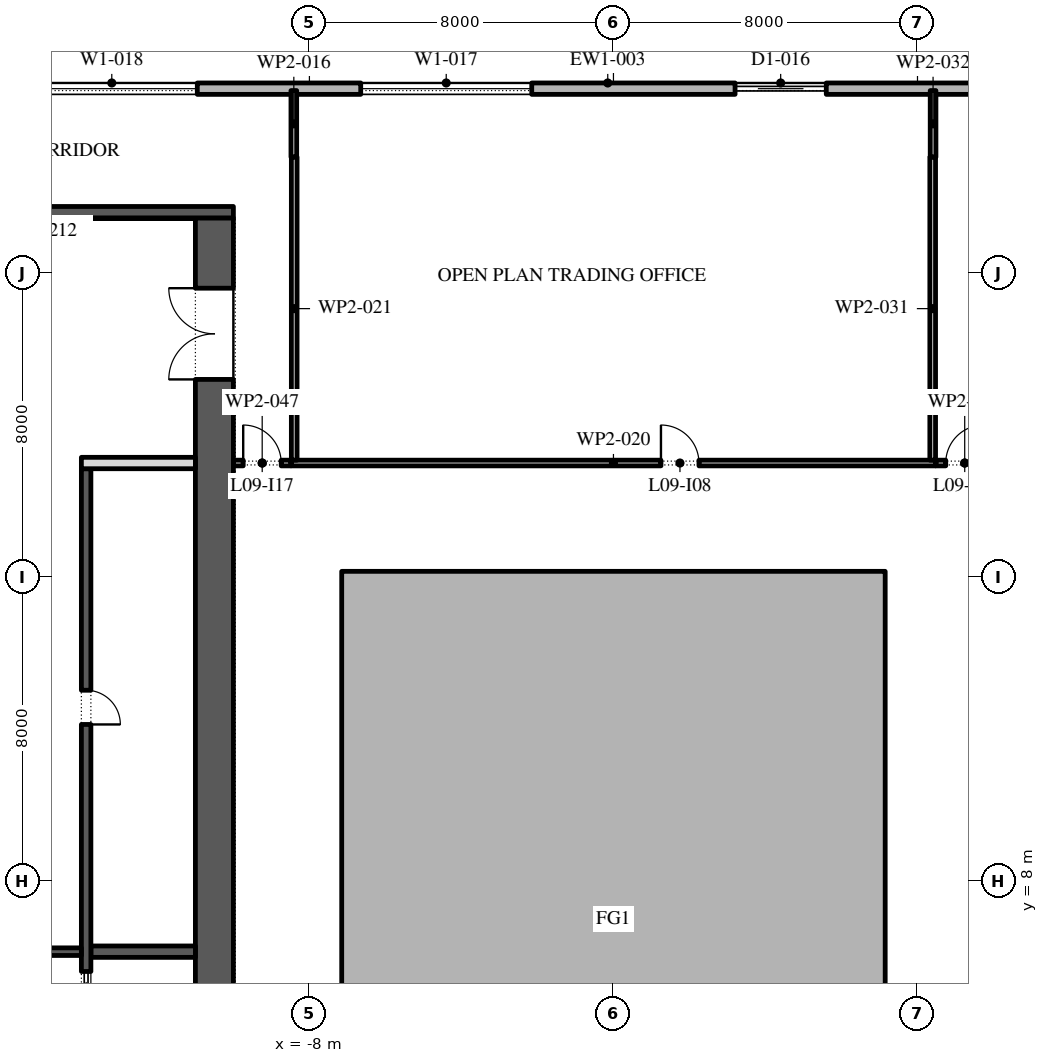
"""IFC4 building model, lengths in metres.
Left out: names, types, materials, properties, quantities, classifications, styles, units other than length and angle.
Written with IfcOpenShell. Run it as: python <this file> out.ifc"""

import sys

from ifc_helpers import new_model, si_unit, direction, frame, frame_2d, origin, place, context, subcontext, project, spatial, polyline, rectangle, outline, extrude, element, fill, save


model = new_model("IFC4")
c1 = context("Model", 3, precision=1e-05, world=origin(), true_north=direction((0.0, 1.0)))
c2 = subcontext(c1, "Body", "Model", "MODEL_VIEW")
j1 = project(units=[si_unit("LENGTHUNIT", "METRE"), si_unit("PLANEANGLEUNIT", "RADIAN")], contexts=[c1])
p1 = place(None, origin())
s1 = spatial("IfcSite", under=j1, at=p1, CompositionType="ELEMENT")
p2 = place(p1, origin())
s2 = spatial("IfcBuilding", under=s1, at=p2, CompositionType="ELEMENT")
p3 = place(p2, frame((0.0, 0.0, 48.0)))
s3 = spatial("IfcBuildingStorey", under=s2, at=p3, CompositionType="ELEMENT", Elevation=48.0)
p4 = place(p3, origin())
e1 = element("IfcWall", 1, at=p4, inside=s3, PredefinedType="STANDARD", context=c2, shape_type="SweptSolid", body=[
    extrude(outline(polyline([(-7.15, -2.15), (7.15, -2.15), (7.15, 16.15), (-7.15, 16.15), (-7.15, -2.15)]), holes=[polyline([(-7.0, -2.0), (-7.0, 16.0), (7.0, 16.0), (7.0, -2.0), (-7.0, -2.0)])]), origin(), (0.0, 0.0, 1.0), 4.0),
])
p5 = place(p3, frame((26.1, 28.85, 0.0), z_axis=(0.0, 0.0, 1.0), x_axis=(-1.0, 0.0, 0.0)))
e2 = element("IfcWall", 2, at=p5, inside=s3, PredefinedType="STANDARD", context=c2, shape_type="SweptSolid", body=[
    extrude(rectangle(XDim=52.5, YDim=0.3, at=frame_2d((26.25, 0.0))), origin(), (0.0, 0.0, 1.0), 4.0),
])
p6 = place(p5, frame((2.0, 0.0, 0.45)))
e3 = element("IfcOpeningElement", 3, at=p6, cuts=e2, PredefinedType="OPENING", context=c2, shape_type="SweptSolid", body=[
    extrude(rectangle(XDim=4.5, YDim=3.05, at=frame_2d((2.25, 1.525))), frame((0.0, 0.16, 0.0), z_axis=(0.0, -1.0, 0.0), x_axis=(1.0, 0.0, 0.0)), (0.0, 0.0, 1.0), 0.32),
])
p7 = place(p5, frame((10.65, 0.0, 0.45)))
e4 = element("IfcOpeningElement", 4, at=p7, cuts=e2, PredefinedType="OPENING", context=c2, shape_type="SweptSolid", body=[
    extrude(rectangle(XDim=4.5, YDim=3.05, at=frame_2d((2.25, 1.525))), frame((0.0, 0.16, 0.0), z_axis=(0.0, -1.0, 0.0), x_axis=(1.0, 0.0, 0.0)), (0.0, 0.0, 1.0), 0.32),
])
p8 = place(p5, frame((20.5, 0.0, 0.0)))
e5 = element("IfcOpeningElement", 5, at=p8, cuts=e2, PredefinedType="OPENING", context=c2, shape_type="SweptSolid", body=[
    extrude(rectangle(XDim=2.4, YDim=3.5, at=frame_2d((1.2, 1.75))), frame((0.0, 0.16, 0.0), z_axis=(0.0, -1.0, 0.0), x_axis=(1.0, 0.0, 0.0)), (0.0, 0.0, 1.0), 0.32),
])
p9 = place(p5, frame((28.25, 0.0, 0.45)))
e6 = element("IfcOpeningElement", 6, at=p9, cuts=e2, PredefinedType="OPENING", context=c2, shape_type="SweptSolid", body=[
    extrude(rectangle(XDim=4.5, YDim=3.05, at=frame_2d((2.25, 1.525))), frame((0.0, 0.16, 0.0), z_axis=(0.0, -1.0, 0.0), x_axis=(1.0, 0.0, 0.0)), (0.0, 0.0, 1.0), 0.32),
])
p10 = place(p5, frame((37.05, 0.0, 0.45)))
e7 = element("IfcOpeningElement", 7, at=p10, cuts=e2, PredefinedType="OPENING", context=c2, shape_type="SweptSolid", body=[
    extrude(rectangle(XDim=4.5, YDim=3.05, at=frame_2d((2.25, 1.525))), frame((0.0, 0.16, 0.0), z_axis=(0.0, -1.0, 0.0), x_axis=(1.0, 0.0, 0.0)), (0.0, 0.0, 1.0), 0.32),
])
p11 = place(p5, frame((45.85, 0.0, 0.45)))
e8 = element("IfcOpeningElement", 8, at=p11, cuts=e2, PredefinedType="OPENING", context=c2, shape_type="SweptSolid", body=[
    extrude(rectangle(XDim=4.5, YDim=3.05, at=frame_2d((2.25, 1.525))), frame((0.0, 0.16, 0.0), z_axis=(0.0, -1.0, 0.0), x_axis=(1.0, 0.0, 0.0)), (0.0, 0.0, 1.0), 0.32),
])
p12 = place(p3, frame((-10.5, -2.45, 0.0), z_axis=(0.0, 0.0, 1.0), x_axis=(0.0, 1.0, 0.0)))
e9 = element("IfcWall", 9, at=p12, inside=s3, PredefinedType="SHEAR", context=c2, shape_type="SweptSolid", body=[
    extrude(rectangle(XDim=27.9, YDim=1.0, at=frame_2d((13.95, 0.0))), origin(), (0.0, 0.0, 1.0), 4.0),
])
p13 = place(p12, frame((23.65, 0.0, 0.0)))
e10 = element("IfcOpeningElement", 10, at=p13, cuts=e9, PredefinedType="OPENING", context=c2, shape_type="SweptSolid", body=[
    extrude(rectangle(XDim=2.4, YDim=2.1, at=frame_2d((1.2, 1.05))), frame((0.0, 0.51, 0.0), z_axis=(0.0, -1.0, 0.0), x_axis=(1.0, 0.0, 0.0)), (0.0, 0.0, 1.0), 1.02),
])
p14 = place(p12, frame((1.087, 0.0, 0.0)))
e11 = element("IfcOpeningElement", 11, at=p14, cuts=e9, PredefinedType="OPENING", context=c2, shape_type="SweptSolid", body=[
    extrude(rectangle(XDim=0.9, YDim=2.1, at=frame_2d((0.45, 1.05))), frame((0.0, 0.51, 0.0), z_axis=(0.0, -1.0, 0.0), x_axis=(1.0, 0.0, 0.0)), (0.0, 0.0, 1.0), 1.02),
])
p15 = place(p12, frame((4.312, 0.0, 0.0)))
e12 = element("IfcOpeningElement", 12, at=p15, cuts=e9, PredefinedType="OPENING", context=c2, shape_type="SweptSolid", body=[
    extrude(rectangle(XDim=0.9, YDim=2.1, at=frame_2d((0.45, 1.05))), frame((0.0, 0.51, 0.0), z_axis=(0.0, -1.0, 0.0), x_axis=(1.0, 0.0, 0.0)), (0.0, 0.0, 1.0), 1.02),
])
p16 = place(p3, frame((-22.0, 25.6, 0.0), z_axis=(0.0, 0.0, 1.0), x_axis=(1.0, 0.0, 0.0)))
e13 = element("IfcWall", 13, at=p16, inside=s3, PredefinedType="SHEAR", context=c2, shape_type="SweptSolid", body=[
    extrude(rectangle(XDim=12.0, YDim=0.3, at=frame_2d((6.0, 0.0))), origin(), (0.0, 0.0, 1.0), 4.0),
])
p17 = place(p3, frame((-13.75, 6.143, 0.0), z_axis=(0.0, 0.0, 1.0), x_axis=(1.0, 0.0, 0.0)))
e14 = element("IfcWall", 14, at=p17, inside=s3, PredefinedType="SHEAR", context=c2, shape_type="SweptSolid", body=[
    extrude(rectangle(XDim=2.75, YDim=0.3, at=frame_2d((1.375, 0.0))), origin(), (0.0, 0.0, 1.0), 4.0),
])
p18 = place(p3, frame((-13.875, -2.45, 0.0), z_axis=(0.0, 0.0, 1.0), x_axis=(0.0, 1.0, 0.0)))
e15 = element("IfcWall", 15, at=p18, inside=s3, PredefinedType="SHEAR", context=c2, shape_type="SweptSolid", body=[
    extrude(rectangle(XDim=21.3, YDim=0.25, at=frame_2d((10.65, 0.0))), origin(), (0.0, 0.0, 1.0), 4.0),
])
p19 = place(p18, frame((14.571, 0.0, 0.0)))
e16 = element("IfcOpeningElement", 16, at=p19, cuts=e15, PredefinedType="OPENING", context=c2, shape_type="SweptSolid", body=[
    extrude(rectangle(XDim=0.9, YDim=2.1, at=frame_2d((0.45, 1.05))), frame((0.0, 0.135, 0.0), z_axis=(0.0, -1.0, 0.0), x_axis=(1.0, 0.0, 0.0)), (0.0, 0.0, 1.0), 0.27),
])
p20 = place(p18, frame((6.971, 0.0, 0.0)))
e17 = element("IfcOpeningElement", 17, at=p20, cuts=e15, PredefinedType="OPENING", context=c2, shape_type="SweptSolid", body=[
    extrude(rectangle(XDim=1.1, YDim=2.1, at=frame_2d((0.55, 1.05))), frame((0.0, 0.135, 0.0), z_axis=(0.0, -1.0, 0.0), x_axis=(1.0, 0.0, 0.0)), (0.0, 0.0, 1.0), 0.27),
])
p21 = place(p3, frame((-14.0, 19.0, 0.0), z_axis=(0.0, 0.0, 1.0), x_axis=(1.0, 0.0, 0.0)))
e18 = element("IfcWall", 18, at=p21, inside=s3, PredefinedType="PARTITIONING", context=c2, shape_type="SweptSolid", body=[
    extrude(rectangle(XDim=3.0, YDim=0.3, at=frame_2d((1.5, 0.0))), origin(), (0.0, 0.0, 1.0), 4.0),
])
p22 = place(p3, frame((-18.0, 6.143, 0.0), z_axis=(0.0, 0.0, 1.0), x_axis=(1.0, 0.0, 0.0)))
e19 = element("IfcWall", 19, at=p22, inside=s3, PredefinedType="SHEAR", context=c2, shape_type="SweptSolid", body=[
    extrude(rectangle(XDim=4.0, YDim=0.2, at=frame_2d((2.0, 0.0))), origin(), (0.0, 0.0, 1.0), 4.0),
])
p23 = place(p22, frame((1.4, 0.0, 0.0)))
e20 = element("IfcOpeningElement", 20, at=p23, cuts=e19, PredefinedType="OPENING", context=c2, shape_type="SweptSolid", body=[
    extrude(rectangle(XDim=1.2, YDim=2.1, at=frame_2d((0.6, 1.05))), frame((0.0, 0.11, 0.0), z_axis=(0.0, -1.0, 0.0), x_axis=(1.0, 0.0, 0.0)), (0.0, 0.0, 1.0), 0.22),
])
p24 = place(p3, frame((-8.41, 28.8, 0.0), z_axis=(0.0, 0.0, 1.0), x_axis=(0.0, -1.0, 0.0)))
e21 = element("IfcWall", 21, at=p24, inside=s3, PredefinedType="PARTITIONING", context=c2, shape_type="SweptSolid", body=[
    extrude(rectangle(XDim=1.75, YDim=0.15, at=frame_2d((0.875, 0.0))), origin(), (0.0, 0.0, 1.0), 4.0),
])
p25 = place(p3, frame((-8.475, 19.0, 0.0), z_axis=(0.0, 0.0, 1.0), x_axis=(1.0, 0.0, 0.0)))
e22 = element("IfcWall", 22, at=p25, inside=s3, PredefinedType="PARTITIONING", context=c2, shape_type="SweptSolid", body=[
    extrude(rectangle(XDim=16.95, YDim=0.15, at=frame_2d((8.475, 0.0))), origin(), (0.0, 0.0, 1.0), 4.0),
])
p26 = place(p25, frame((9.725, 0.0, 0.0)))
e23 = element("IfcOpeningElement", 23, at=p26, cuts=e22, PredefinedType="OPENING", context=c2, shape_type="SweptSolid", body=[
    extrude(rectangle(XDim=1.0, YDim=2.1, at=frame_2d((0.5, 1.05))), frame((0.0, 0.085, 0.0), z_axis=(0.0, -1.0, 0.0), x_axis=(1.0, 0.0, 0.0)), (0.0, 0.0, 1.0), 0.17),
])
for number, where, z_axis, x_axis in (
    (24, (-8.4, 27.05, 0.0), (0.0, 0.0, 1.0), (0.0, -1.0, 0.0)),
    (25, (8.4, 19.075, 0.0), (0.0, 0.0, 1.0), (0.0, 1.0, 0.0)),
):
    element("IfcWall", number, at=place(p3, frame(where, z_axis=z_axis, x_axis=x_axis)), inside=s3, PredefinedType="PARTITIONING", context=c2, shape_type="SweptSolid", body=[
        extrude(rectangle(XDim=7.975, YDim=0.15, at=frame_2d((3.988, 0.0))), origin(), (0.0, 0.0, 1.0), 4.0),
    ])
p27 = place(p3, frame((8.41, 27.05, 0.0), z_axis=(0.0, 0.0, 1.0), x_axis=(0.0, 1.0, 0.0)))
e26 = element("IfcWall", 26, at=p27, inside=s3, PredefinedType="PARTITIONING", context=c2, shape_type="SweptSolid", body=[
    extrude(rectangle(XDim=1.75, YDim=0.15, at=frame_2d((0.875, 0.0))), origin(), (0.0, 0.0, 1.0), 4.0),
])
p28 = place(p3, frame((-10.0, 19.0, 0.0), z_axis=(0.0, 0.0, 1.0), x_axis=(1.0, 0.0, 0.0)))
e27 = element("IfcWall", 27, at=p28, inside=s3, PredefinedType="PARTITIONING", context=c2, shape_type="SweptSolid", body=[
    extrude(rectangle(XDim=1.515, YDim=0.15, at=frame_2d((0.757, 0.0))), origin(), (0.0, 0.0, 1.0), 4.0),
])
p29 = place(p28, frame((0.258, 0.0, 0.0)))
e28 = element("IfcOpeningElement", 28, at=p29, cuts=e27, PredefinedType="OPENING", context=c2, shape_type="SweptSolid", body=[
    extrude(rectangle(XDim=1.0, YDim=2.1, at=frame_2d((0.5, 1.05))), frame((0.0, 0.085, 0.0), z_axis=(0.0, -1.0, 0.0), x_axis=(1.0, 0.0, 0.0)), (0.0, 0.0, 1.0), 0.17),
])
p30 = place(p3, frame((8.485, 19.0, 0.0), z_axis=(0.0, 0.0, 1.0), x_axis=(1.0, 0.0, 0.0)))
e29 = element("IfcWall", 29, at=p30, inside=s3, PredefinedType="PARTITIONING", context=c2, shape_type="SweptSolid", body=[
    extrude(rectangle(XDim=1.515, YDim=0.15, at=frame_2d((0.757, 0.0))), origin(), (0.0, 0.0, 1.0), 4.0),
])
p31 = place(p30, frame((0.258, 0.0, 0.0)))
e30 = element("IfcOpeningElement", 30, at=p31, cuts=e29, PredefinedType="OPENING", context=c2, shape_type="SweptSolid", body=[
    extrude(rectangle(XDim=1.0, YDim=2.1, at=frame_2d((0.5, 1.05))), frame((0.0, 0.085, 0.0), z_axis=(0.0, -1.0, 0.0), x_axis=(1.0, 0.0, 0.0)), (0.0, 0.0, 1.0), 0.17),
])
p32 = place(p8, origin())
e31 = element("IfcDoor", 31, at=p32, inside=s3, OperationType="DOUBLE_DOOR_SLIDING", PredefinedType="DOOR", context=c2, shape_type="SweptSolid", body=[
    extrude(rectangle(XDim=2.4, YDim=3.5, at=frame_2d((1.2, 1.75))), frame((0.0, 0.025, 0.0), z_axis=(0.0, -1.0, 0.0), x_axis=(1.0, 0.0, 0.0)), (0.0, 0.0, 1.0), 0.05),
])
fill(e5, e31)
p33 = place(p9, origin())
e32 = element("IfcWindow", 32, at=p33, inside=s3, PartitioningType="DOUBLE_PANEL_VERTICAL", PredefinedType="WINDOW", context=c2, shape_type="SweptSolid", body=[
    extrude(rectangle(XDim=4.5, YDim=3.05, at=frame_2d((2.25, 1.525))), frame((0.0, 0.03, 0.0), z_axis=(0.0, -1.0, 0.0), x_axis=(1.0, 0.0, 0.0)), (0.0, 0.0, 1.0), 0.06),
])
fill(e6, e32)
p34 = place(p10, origin())
e33 = element("IfcWindow", 33, at=p34, inside=s3, PartitioningType="DOUBLE_PANEL_VERTICAL", PredefinedType="WINDOW", context=c2, shape_type="SweptSolid", body=[
    extrude(rectangle(XDim=4.5, YDim=3.05, at=frame_2d((2.25, 1.525))), frame((0.0, 0.03, 0.0), z_axis=(0.0, -1.0, 0.0), x_axis=(1.0, 0.0, 0.0)), (0.0, 0.0, 1.0), 0.06),
])
fill(e7, e33)
p35 = place(p19, frame((0.9, -0.2, 0.0), z_axis=(0.0, 0.0, 1.0), x_axis=(-1.0, 0.0, 0.0)))
e34 = element("IfcDoor", 34, at=p35, inside=s3, OperationType="SINGLE_SWING_LEFT", PredefinedType="DOOR", context=c2, shape_type="SweptSolid", body=[
    extrude(rectangle(XDim=0.9, YDim=2.1, at=frame_2d((0.45, 1.05))), frame((0.0, -0.075, 0.0), z_axis=(0.0, -1.0, 0.0), x_axis=(1.0, 0.0, 0.0)), (0.0, 0.0, 1.0), 0.05),
])
fill(e16, e34)
p36 = place(p20, origin())
e35 = element("IfcDoor", 35, at=p36, inside=s3, OperationType="SLIDING_TO_LEFT", PredefinedType="DOOR", context=c2, shape_type="SweptSolid", body=[
    extrude(rectangle(XDim=1.1, YDim=2.1, at=frame_2d((0.55, 1.05))), frame((0.0, 0.025, 0.0), z_axis=(0.0, -1.0, 0.0), x_axis=(1.0, 0.0, 0.0)), (0.0, 0.0, 1.0), 0.05),
])
fill(e17, e35)
p37 = place(p13, origin())
e36 = element("IfcDoor", 36, at=p37, inside=s3, OperationType="DOUBLE_DOOR_SINGLE_SWING", PredefinedType="DOOR", context=c2, shape_type="SweptSolid", body=[
    extrude(rectangle(XDim=2.4, YDim=2.1, at=frame_2d((1.2, 1.05))), frame((0.0, 0.025, 0.0), z_axis=(0.0, -1.0, 0.0), x_axis=(1.0, 0.0, 0.0)), (0.0, 0.0, 1.0), 0.05),
])
fill(e10, e36)
p38 = place(p26, origin())
e37 = element("IfcDoor", 37, at=p38, inside=s3, OperationType="SINGLE_SWING_RIGHT", PredefinedType="DOOR", context=c2, shape_type="SweptSolid", body=[
    extrude(rectangle(XDim=1.0, YDim=2.1, at=frame_2d((0.5, 1.05))), frame((0.0, 0.025, 0.0), z_axis=(0.0, -1.0, 0.0), x_axis=(1.0, 0.0, 0.0)), (0.0, 0.0, 1.0), 0.05),
])
fill(e23, e37)
p39 = place(p29, origin())
e38 = element("IfcDoor", 38, at=p39, inside=s3, OperationType="SINGLE_SWING_RIGHT", PredefinedType="DOOR", context=c2, shape_type="SweptSolid", body=[
    extrude(rectangle(XDim=1.0, YDim=2.1, at=frame_2d((0.5, 1.05))), frame((0.0, 0.025, 0.0), z_axis=(0.0, -1.0, 0.0), x_axis=(1.0, 0.0, 0.0)), (0.0, 0.0, 1.0), 0.05),
])
fill(e28, e38)
p40 = place(p31, origin())
e39 = element("IfcDoor", 39, at=p40, inside=s3, OperationType="SINGLE_SWING_LEFT", PredefinedType="DOOR", context=c2, shape_type="SweptSolid", body=[
    extrude(rectangle(XDim=1.0, YDim=2.1, at=frame_2d((0.5, 1.05))), frame((0.0, 0.025, 0.0), z_axis=(0.0, -1.0, 0.0), x_axis=(1.0, 0.0, 0.0)), (0.0, 0.0, 1.0), 0.05),
])
fill(e30, e39)
save(model, sys.argv[1])
